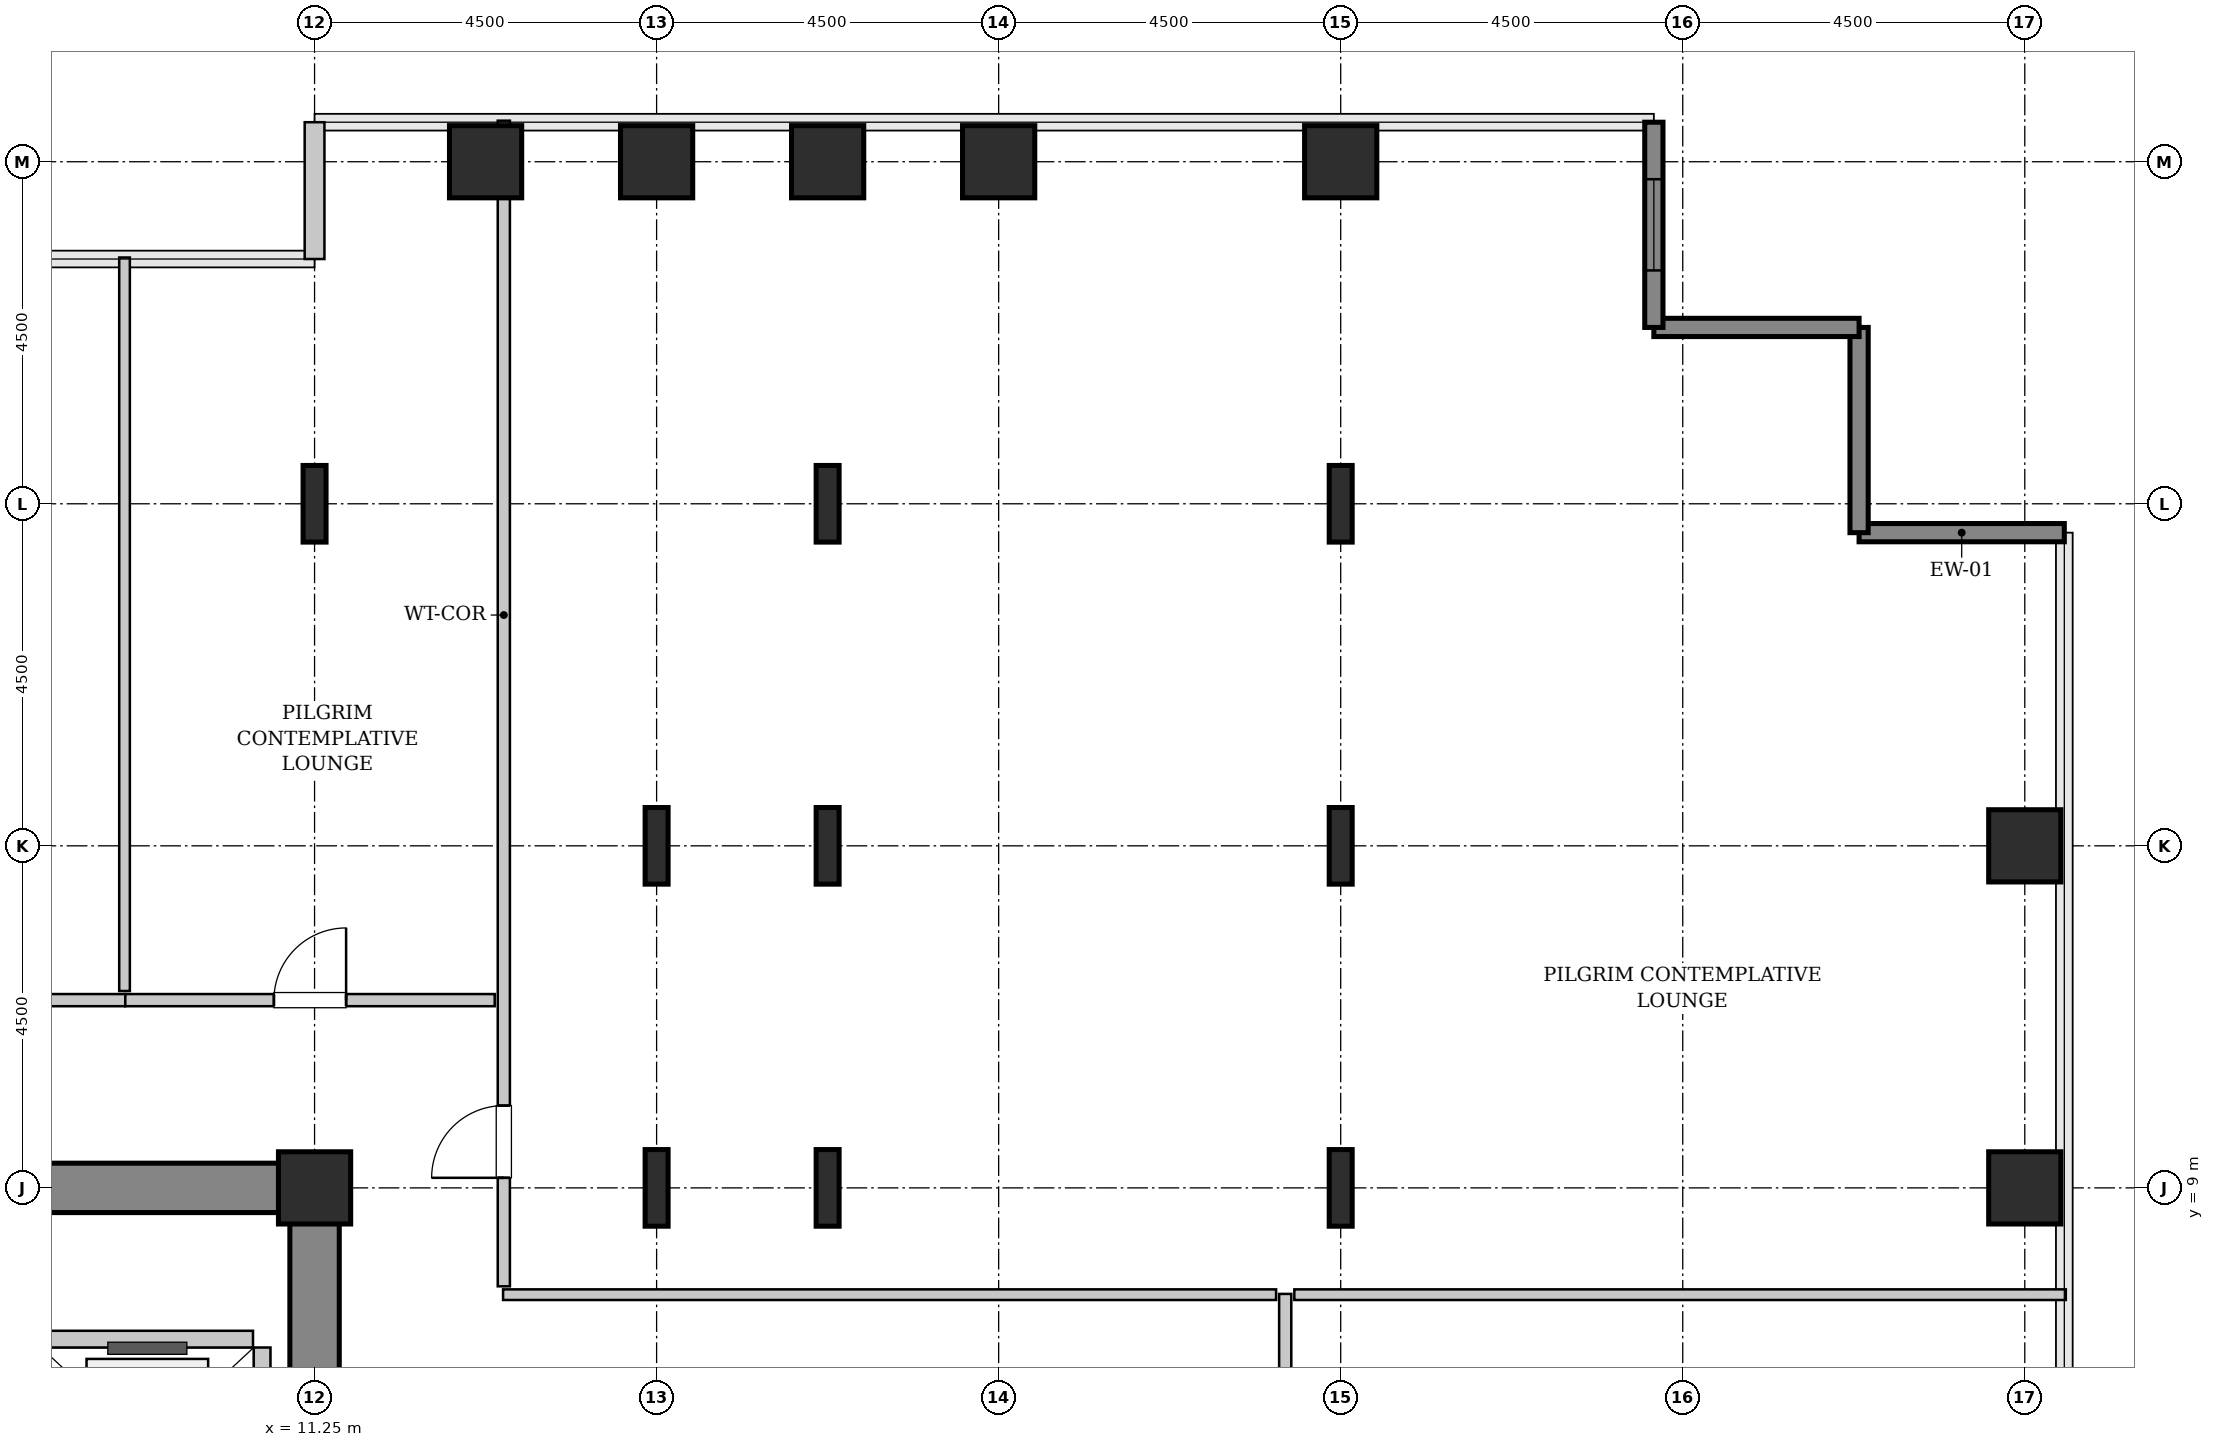
"""IFC4 building model, lengths in metres.
Left out: names, types, materials, properties, quantities, classifications, styles, units other than length and angle.
Written with IfcOpenShell. Run it as: python <this file> out.ifc"""

import sys

from ifc_helpers import new_model, si_unit, direction, frame, frame_2d, origin, origin_2d, place, context, subcontext, project, spatial, rectangle, hollow_rectangle, i_section, extrude, source, transform, mapped, element, fill, save


model = new_model("IFC4")
c1 = context("Model", 3, precision=1e-05, world=origin(), true_north=direction((0.0, 1.0)))
c2 = subcontext(c1, "Body", "Model", "MODEL_VIEW")
j1 = project(units=[si_unit("LENGTHUNIT", "METRE"), si_unit("PLANEANGLEUNIT", "RADIAN")], contexts=[c1])
p1 = place(None, origin())
s1 = spatial("IfcSite", under=j1, at=p1, CompositionType="ELEMENT")
p2 = place(p1, origin())
s2 = spatial("IfcBuilding", under=s1, at=p2, CompositionType="ELEMENT")
p3 = place(p2, frame((0.0, 0.0, 82.4)))
s3 = spatial("IfcBuildingStorey", under=s2, at=p3, CompositionType="ELEMENT", Elevation=82.4)
m1 = source(origin(), c2, "Body", "SweptSolid", [
    extrude(rectangle(XDim=10.025, YDim=0.65, at=frame_2d((5.012, 0.0))), origin(), (0.0, 0.0, 1.0), 3.8),
])
p4 = place(p3, frame((1.55, 9.0, 0.0), z_axis=(0.0, 0.0, 1.0), x_axis=(1.0, 0.0, 0.0)))
e1 = element("IfcWall", 1, at=p4, inside=s3, PredefinedType="SHEAR", context=c2, shape_type="MappedRepresentation", body=[
    mapped(m1, transform((0.0, 0.0, 0.0), x_axis=(1.0, 0.0, 0.0), y_axis=(0.0, 1.0, 0.0), z_axis=(0.0, 0.0, 1.0), scale=1.0)),
])
m2 = source(origin(), c2, "Body", "SweptSolid", [
    extrude(rectangle(XDim=7.325, YDim=0.65, at=frame_2d((3.663, 0.0))), origin(), (0.0, 0.0, 1.0), 3.8),
])
p5 = place(p3, frame((11.25, 1.35, 0.0), z_axis=(0.0, 0.0, 1.0), x_axis=(0.0, 1.0, 0.0)))
e2 = element("IfcWall", 2, at=p5, inside=s3, PredefinedType="SHEAR", context=c2, shape_type="MappedRepresentation", body=[
    mapped(m2, transform((0.0, 0.0, 0.0), x_axis=(1.0, 0.0, 0.0), y_axis=(0.0, 1.0, 0.0), z_axis=(0.0, 0.0, 1.0), scale=1.0)),
])
m3 = source(origin(), c2, "Body", "SweptSolid", [
    extrude(hollow_rectangle(XDim=0.95, YDim=0.95, WallThickness=0.045, InnerFilletRadius=0.045, OuterFilletRadius=0.09, at=origin_2d()), origin(), (0.0, 0.0, 1.0), 3.8),
])
p6 = place(p3, frame((11.25, 9.0, 0.0), z_axis=(0.0, 0.0, 1.0), x_axis=(1.0, 0.0, 0.0)))
e3 = element("IfcColumn", 3, at=p6, inside=s3, PredefinedType="COLUMN", context=c2, shape_type="MappedRepresentation", body=[
    mapped(m3, transform((0.0, 0.0, 0.0), x_axis=(1.0, 0.0, 0.0), y_axis=(0.0, 1.0, 0.0), z_axis=(0.0, 0.0, 1.0), scale=1.0)),
])
m4 = source(origin(), c2, "Body", "SweptSolid", [
    extrude(i_section(OverallWidth=0.302, OverallDepth=1.008, WebThickness=0.021, FlangeThickness=0.04, FilletRadius=0.03, at=origin_2d()), origin(), (0.0, 0.0, 1.0), 3.8),
])
p7 = place(p3, frame((11.25, 18.0, 0.0), z_axis=(0.0, 0.0, 1.0), x_axis=(1.0, 0.0, 0.0)))
e4 = element("IfcColumn", 4, at=p7, inside=s3, PredefinedType="COLUMN", context=c2, shape_type="MappedRepresentation", body=[
    mapped(m4, transform((0.0, 0.0, 0.0), x_axis=(1.0, 0.0, 0.0), y_axis=(0.0, 1.0, 0.0), z_axis=(0.0, 0.0, 1.0), scale=1.0)),
])
m5 = source(origin(), c2, "Body", "SweptSolid", [
    extrude(hollow_rectangle(XDim=0.95, YDim=0.95, WallThickness=0.045, InnerFilletRadius=0.045, OuterFilletRadius=0.09, at=origin_2d()), origin(), (0.0, 0.0, 1.0), 3.8),
])
p8 = place(p3, frame((13.5, 22.5, 0.0), z_axis=(0.0, 0.0, 1.0), x_axis=(1.0, 0.0, 0.0)))
e5 = element("IfcColumn", 5, at=p8, inside=s3, PredefinedType="COLUMN", context=c2, shape_type="MappedRepresentation", body=[
    mapped(m5, transform((0.0, 0.0, 0.0), x_axis=(1.0, 0.0, 0.0), y_axis=(0.0, 1.0, 0.0), z_axis=(0.0, 0.0, 1.0), scale=1.0)),
])
for number, where, z_axis, x_axis in (
    (6, (15.75, 9.0, 0.0), (0.0, 0.0, 1.0), (1.0, 0.0, 0.0)),
    (7, (15.75, 13.5, 0.0), (0.0, 0.0, 1.0), (1.0, 0.0, 0.0)),
):
    element("IfcColumn", number, at=place(p3, frame(where, z_axis=z_axis, x_axis=x_axis)), inside=s3, PredefinedType="COLUMN", context=c2, shape_type="MappedRepresentation", body=[
        mapped(m4, transform((0.0, 0.0, 0.0), x_axis=(1.0, 0.0, 0.0), y_axis=(0.0, 1.0, 0.0), z_axis=(0.0, 0.0, 1.0), scale=1.0)),
    ])
p9 = place(p3, frame((15.75, 22.5, 0.0), z_axis=(0.0, 0.0, 1.0), x_axis=(1.0, 0.0, 0.0)))
e8 = element("IfcColumn", 8, at=p9, inside=s3, PredefinedType="COLUMN", context=c2, shape_type="MappedRepresentation", body=[
    mapped(m5, transform((0.0, 0.0, 0.0), x_axis=(1.0, 0.0, 0.0), y_axis=(0.0, 1.0, 0.0), z_axis=(0.0, 0.0, 1.0), scale=1.0)),
])
for number, where, z_axis, x_axis in (
    (9, (18.0, 9.0, 0.0), (0.0, 0.0, 1.0), (1.0, 0.0, 0.0)),
    (10, (18.0, 13.5, 0.0), (0.0, 0.0, 1.0), (1.0, 0.0, 0.0)),
    (11, (18.0, 18.0, 0.0), (0.0, 0.0, 1.0), (1.0, 0.0, 0.0)),
):
    element("IfcColumn", number, at=place(p3, frame(where, z_axis=z_axis, x_axis=x_axis)), inside=s3, PredefinedType="COLUMN", context=c2, shape_type="MappedRepresentation", body=[
        mapped(m4, transform((0.0, 0.0, 0.0), x_axis=(1.0, 0.0, 0.0), y_axis=(0.0, 1.0, 0.0), z_axis=(0.0, 0.0, 1.0), scale=1.0)),
    ])
for number, where, z_axis, x_axis in (
    (12, (18.0, 22.5, 0.0), (0.0, 0.0, 1.0), (1.0, 0.0, 0.0)),
    (13, (20.25, 22.5, 0.0), (0.0, 0.0, 1.0), (1.0, 0.0, 0.0)),
):
    element("IfcColumn", number, at=place(p3, frame(where, z_axis=z_axis, x_axis=x_axis)), inside=s3, PredefinedType="COLUMN", context=c2, shape_type="MappedRepresentation", body=[
        mapped(m5, transform((0.0, 0.0, 0.0), x_axis=(1.0, 0.0, 0.0), y_axis=(0.0, 1.0, 0.0), z_axis=(0.0, 0.0, 1.0), scale=1.0)),
    ])
for number, where, z_axis, x_axis in (
    (14, (24.75, 9.0, 0.0), (0.0, 0.0, 1.0), (1.0, 0.0, 0.0)),
    (15, (24.75, 13.5, 0.0), (0.0, 0.0, 1.0), (1.0, 0.0, 0.0)),
    (16, (24.75, 18.0, 0.0), (0.0, 0.0, 1.0), (1.0, 0.0, 0.0)),
):
    element("IfcColumn", number, at=place(p3, frame(where, z_axis=z_axis, x_axis=x_axis)), inside=s3, PredefinedType="COLUMN", context=c2, shape_type="MappedRepresentation", body=[
        mapped(m4, transform((0.0, 0.0, 0.0), x_axis=(1.0, 0.0, 0.0), y_axis=(0.0, 1.0, 0.0), z_axis=(0.0, 0.0, 1.0), scale=1.0)),
    ])
for number, where, z_axis, x_axis in (
    (17, (24.75, 22.5, 0.0), (0.0, 0.0, 1.0), (1.0, 0.0, 0.0)),
    (18, (33.75, 9.0, 0.0), (0.0, 0.0, 1.0), (1.0, 0.0, 0.0)),
    (19, (33.75, 13.5, 0.0), (0.0, 0.0, 1.0), (1.0, 0.0, 0.0)),
):
    element("IfcColumn", number, at=place(p3, frame(where, z_axis=z_axis, x_axis=x_axis)), inside=s3, PredefinedType="COLUMN", context=c2, shape_type="MappedRepresentation", body=[
        mapped(m5, transform((0.0, 0.0, 0.0), x_axis=(1.0, 0.0, 0.0), y_axis=(0.0, 1.0, 0.0), z_axis=(0.0, 0.0, 1.0), scale=1.0)),
    ])
m6 = source(origin(), c2, "Body", "SweptSolid", [
    extrude(rectangle(XDim=2.7, YDim=0.24, at=frame_2d((1.35, 0.0))), origin(), (0.0, 0.0, 1.0), 3.5),
])
for number, where, z_axis, x_axis in (
    (20, (34.27, 17.62, 0.0), (0.0, 0.0, 1.0), (-1.0, 0.0, 0.0)),
    (21, (31.57, 17.62, 0.0), (0.0, 0.0, 1.0), (0.0, 1.0, 0.0)),
    (22, (31.57, 20.32, 0.0), (0.0, 0.0, 1.0), (-1.0, 0.0, 0.0)),
):
    element("IfcWall", number, at=place(p3, frame(where, z_axis=z_axis, x_axis=x_axis)), inside=s3, PredefinedType="SHEAR", context=c2, shape_type="MappedRepresentation", body=[
        mapped(m6, transform((0.0, 0.0, 0.0), x_axis=(1.0, 0.0, 0.0), y_axis=(0.0, 1.0, 0.0), z_axis=(0.0, 0.0, 1.0), scale=1.0)),
    ])
p10 = place(p3, frame((28.87, 20.32, 0.0), z_axis=(0.0, 0.0, 1.0), x_axis=(0.0, 1.0, 0.0)))
e23 = element("IfcWall", 23, at=p10, inside=s3, PredefinedType="SHEAR", context=c2, shape_type="MappedRepresentation", body=[
    mapped(m6, transform((0.0, 0.0, 0.0), x_axis=(1.0, 0.0, 0.0), y_axis=(0.0, 1.0, 0.0), z_axis=(0.0, 0.0, 1.0), scale=1.0)),
])
p11 = place(p10, frame((0.75, 0.0, 0.85)))
e24 = element("IfcOpeningElement", 24, at=p11, cuts=e23, PredefinedType="OPENING", context=c2, shape_type="SweptSolid", body=[
    extrude(rectangle(XDim=1.2, YDim=1.8, at=frame_2d((0.6, 0.9))), frame((0.0, 0.13, 0.0), z_axis=(0.0, -1.0, 0.0), x_axis=(1.0, 0.0, 0.0)), (0.0, 0.0, 1.0), 0.26),
])
m7 = source(origin(), c2, "Body", "SweptSolid", [
    extrude(rectangle(XDim=1.8, YDim=0.26, at=frame_2d((0.9, 0.0))), origin(), (0.0, 0.0, 1.0), 3.5),
])
p12 = place(p3, frame((11.25, 23.02, 0.0), z_axis=(0.0, 0.0, 1.0), x_axis=(0.0, -1.0, 0.0)))
e25 = element("IfcWall", 25, at=p12, inside=s3, PredefinedType="SOLIDWALL", context=c2, shape_type="MappedRepresentation", body=[
    mapped(m7, transform((0.0, 0.0, 0.0), x_axis=(1.0, 0.0, 0.0), y_axis=(0.0, 1.0, 0.0), z_axis=(0.0, 0.0, 1.0), scale=1.0)),
])
m8 = source(origin(), c2, "Body", "SweptSolid", [
    extrude(rectangle(XDim=5.45, YDim=0.22, at=frame_2d((2.725, 0.0))), origin(), (0.0, 0.0, 1.0), 3.485),
])
p13 = place(p3, frame((10.56, 1.45, 0.0), z_axis=(0.0, 0.0, 1.0), x_axis=(0.0, 1.0, 0.0)))
e26 = element("IfcWall", 26, at=p13, inside=s3, PredefinedType="SOLIDWALL", context=c2, shape_type="MappedRepresentation", body=[
    mapped(m8, transform((0.0, 0.0, 0.0), x_axis=(1.0, 0.0, 0.0), y_axis=(0.0, 1.0, 0.0), z_axis=(0.0, 0.0, 1.0), scale=1.0)),
])
m9 = source(origin(), c2, "Body", "SweptSolid", [
    extrude(rectangle(XDim=2.78, YDim=0.22, at=frame_2d((1.39, 0.0))), origin(), (0.0, 0.0, 1.0), 3.485),
])
p14 = place(p3, frame((10.44, 7.01, 0.0), z_axis=(0.0, 0.0, 1.0), x_axis=(-1.0, 0.0, 0.0)))
e27 = element("IfcWall", 27, at=p14, inside=s3, PredefinedType="SOLIDWALL", context=c2, shape_type="MappedRepresentation", body=[
    mapped(m9, transform((0.0, 0.0, 0.0), x_axis=(1.0, 0.0, 0.0), y_axis=(0.0, 1.0, 0.0), z_axis=(0.0, 0.0, 1.0), scale=1.0)),
])
m10 = source(origin(), c2, "Body", "SweptSolid", [
    extrude(rectangle(XDim=15.7, YDim=0.16, at=frame_2d((7.85, 0.0))), origin(), (0.0, 0.0, 1.0), 3.485),
])
p15 = place(p3, frame((24.02, -8.095, 0.0), z_axis=(0.0, 0.0, 1.0), x_axis=(0.0, 1.0, 0.0)))
e28 = element("IfcWall", 28, at=p15, inside=s3, PredefinedType="PARTITIONING", context=c2, shape_type="MappedRepresentation", body=[
    mapped(m10, transform((0.0, 0.0, 0.0), x_axis=(1.0, 0.0, 0.0), y_axis=(0.0, 1.0, 0.0), z_axis=(0.0, 0.0, 1.0), scale=1.0)),
])
p16 = place(p15, frame((9.87, 0.0, 0.0)))
e29 = element("IfcOpeningElement", 29, at=p16, cuts=e28, PredefinedType="OPENING", context=c2, shape_type="SweptSolid", body=[
    extrude(rectangle(XDim=0.95, YDim=2.1, at=frame_2d((0.475, 1.05))), frame((0.0, 0.09, 0.0), z_axis=(0.0, -1.0, 0.0), x_axis=(1.0, 0.0, 0.0)), (0.0, 0.0, 1.0), 0.18),
])
m11 = source(origin(), c2, "Body", "SweptSolid", [
    extrude(rectangle(XDim=10.17, YDim=0.14, at=frame_2d((5.085, 0.0))), origin(), (0.0, 0.0, 1.0), 3.485),
])
p17 = place(p3, frame((13.73, 7.595, 0.0), z_axis=(0.0, 0.0, 1.0), x_axis=(1.0, 0.0, 0.0)))
e30 = element("IfcWall", 30, at=p17, inside=s3, PredefinedType="PARTITIONING", context=c2, shape_type="MappedRepresentation", body=[
    mapped(m11, transform((0.0, 0.0, 0.0), x_axis=(1.0, 0.0, 0.0), y_axis=(0.0, 1.0, 0.0), z_axis=(0.0, 0.0, 1.0), scale=1.0)),
])
m12 = source(origin(), c2, "Body", "SweptSolid", [
    extrude(rectangle(XDim=10.15, YDim=0.14, at=frame_2d((5.075, 0.0))), origin(), (0.0, 0.0, 1.0), 3.485),
])
p18 = place(p3, frame((24.14, 7.595, 0.0), z_axis=(0.0, 0.0, 1.0), x_axis=(1.0, 0.0, 0.0)))
e31 = element("IfcWall", 31, at=p18, inside=s3, PredefinedType="PARTITIONING", context=c2, shape_type="MappedRepresentation", body=[
    mapped(m12, transform((0.0, 0.0, 0.0), x_axis=(1.0, 0.0, 0.0), y_axis=(0.0, 1.0, 0.0), z_axis=(0.0, 0.0, 1.0), scale=1.0)),
])
m13 = source(origin(), c2, "Body", "SweptSolid", [
    extrude(rectangle(XDim=15.335, YDim=0.16, at=frame_2d((7.667, 0.0))), origin(), (0.0, 0.0, 1.0), 3.485),
])
p19 = place(p3, frame((13.74, 7.705, 0.0), z_axis=(0.0, 0.0, 1.0), x_axis=(0.0, 1.0, 0.0)))
e32 = element("IfcWall", 32, at=p19, inside=s3, PredefinedType="PARTITIONING", context=c2, shape_type="MappedRepresentation", body=[
    mapped(m13, transform((0.0, 0.0, 0.0), x_axis=(1.0, 0.0, 0.0), y_axis=(0.0, 1.0, 0.0), z_axis=(0.0, 0.0, 1.0), scale=1.0)),
])
p20 = place(p19, frame((1.427, 0.0, 0.0)))
e33 = element("IfcOpeningElement", 33, at=p20, cuts=e32, PredefinedType="OPENING", context=c2, shape_type="SweptSolid", body=[
    extrude(rectangle(XDim=0.95, YDim=2.1, at=frame_2d((0.475, 1.05))), frame((0.0, 0.09, 0.0), z_axis=(0.0, -1.0, 0.0), x_axis=(1.0, 0.0, 0.0)), (0.0, 0.0, 1.0), 0.18),
])
m14 = source(origin(), c2, "Body", "SweptSolid", [
    extrude(rectangle(XDim=4.965, YDim=0.16, at=frame_2d((2.482, 0.0))), origin(), (0.0, 0.0, 1.0), 3.485),
])
p21 = place(p3, frame((3.795, 11.47, 0.0), z_axis=(0.0, 0.0, 1.0), x_axis=(1.0, 0.0, 0.0)))
e34 = element("IfcWall", 34, at=p21, inside=s3, PredefinedType="PARTITIONING", context=c2, shape_type="MappedRepresentation", body=[
    mapped(m14, transform((0.0, 0.0, 0.0), x_axis=(1.0, 0.0, 0.0), y_axis=(0.0, 1.0, 0.0), z_axis=(0.0, 0.0, 1.0), scale=1.0)),
])
p22 = place(p21, frame((2.008, 0.0, 0.0)))
e35 = element("IfcOpeningElement", 35, at=p22, cuts=e34, PredefinedType="OPENING", context=c2, shape_type="SweptSolid", body=[
    extrude(rectangle(XDim=0.95, YDim=2.1, at=frame_2d((0.475, 1.05))), frame((0.0, 0.09, 0.0), z_axis=(0.0, -1.0, 0.0), x_axis=(1.0, 0.0, 0.0)), (0.0, 0.0, 1.0), 0.18),
])
m15 = source(origin(), c2, "Body", "SweptSolid", [
    extrude(rectangle(XDim=9.65, YDim=0.14, at=frame_2d((4.825, 0.0))), origin(), (0.0, 0.0, 1.0), 3.485),
])
p23 = place(p3, frame((8.75, 11.59, 0.0), z_axis=(0.0, 0.0, 1.0), x_axis=(0.0, 1.0, 0.0)))
e36 = element("IfcWall", 36, at=p23, inside=s3, PredefinedType="PARTITIONING", context=c2, shape_type="MappedRepresentation", body=[
    mapped(m15, transform((0.0, 0.0, 0.0), x_axis=(1.0, 0.0, 0.0), y_axis=(0.0, 1.0, 0.0), z_axis=(0.0, 0.0, 1.0), scale=1.0)),
])
m16 = source(origin(), c2, "Body", "SweptSolid", [
    extrude(rectangle(XDim=4.86, YDim=0.16, at=frame_2d((2.43, 0.0))), origin(), (0.0, 0.0, 1.0), 3.485),
])
p24 = place(p3, frame((8.76, 11.47, 0.0), z_axis=(0.0, 0.0, 1.0), x_axis=(1.0, 0.0, 0.0)))
e37 = element("IfcWall", 37, at=p24, inside=s3, PredefinedType="PARTITIONING", context=c2, shape_type="MappedRepresentation", body=[
    mapped(m16, transform((0.0, 0.0, 0.0), x_axis=(1.0, 0.0, 0.0), y_axis=(0.0, 1.0, 0.0), z_axis=(0.0, 0.0, 1.0), scale=1.0)),
])
p25 = place(p24, frame((1.955, 0.0, 0.0)))
e38 = element("IfcOpeningElement", 38, at=p25, cuts=e37, PredefinedType="OPENING", context=c2, shape_type="SweptSolid", body=[
    extrude(rectangle(XDim=0.95, YDim=2.1, at=frame_2d((0.475, 1.05))), frame((0.0, 0.09, 0.0), z_axis=(0.0, -1.0, 0.0), x_axis=(1.0, 0.0, 0.0)), (0.0, 0.0, 1.0), 0.18),
])
m17 = source(origin(), c2, "Body", "SweptSolid", [
    extrude(rectangle(XDim=1.2, YDim=1.8, at=frame_2d((0.6, 0.9))), frame((0.0, 0.03, 0.0), z_axis=(0.0, -1.0, 0.0), x_axis=(1.0, 0.0, 0.0)), (0.0, 0.0, 1.0), 0.06),
])
p26 = place(p11, origin())
e39 = element("IfcWindow", 39, at=p26, inside=s3, PartitioningType="SINGLE_PANEL", PredefinedType="WINDOW", context=c2, shape_type="MappedRepresentation", body=[
    mapped(m17, transform((0.0, 0.0, 0.0), x_axis=(1.0, 0.0, 0.0), y_axis=(0.0, 1.0, 0.0), z_axis=(0.0, 0.0, 1.0), scale=1.0)),
])
fill(e24, e39)
m18 = source(origin(), c2, "Body", "SweptSolid", [
    extrude(rectangle(XDim=0.95, YDim=2.1, at=frame_2d((0.475, 1.05))), frame((0.0, 0.025, 0.0), z_axis=(0.0, -1.0, 0.0), x_axis=(1.0, 0.0, 0.0)), (0.0, 0.0, 1.0), 0.05),
])
p27 = place(p20, origin())
e40 = element("IfcDoor", 40, at=p27, inside=s3, OperationType="SINGLE_SWING_LEFT", PredefinedType="DOOR", context=c2, shape_type="MappedRepresentation", body=[
    mapped(m18, transform((0.0, 0.0, 0.0), x_axis=(1.0, 0.0, 0.0), y_axis=(0.0, 1.0, 0.0), z_axis=(0.0, 0.0, 1.0), scale=1.0)),
])
fill(e33, e40)
p28 = place(p25, origin())
e41 = element("IfcDoor", 41, at=p28, inside=s3, OperationType="SINGLE_SWING_RIGHT", PredefinedType="DOOR", context=c2, shape_type="MappedRepresentation", body=[
    mapped(m18, transform((0.0, 0.0, 0.0), x_axis=(1.0, 0.0, 0.0), y_axis=(0.0, 1.0, 0.0), z_axis=(0.0, 0.0, 1.0), scale=1.0)),
])
fill(e38, e41)
save(model, sys.argv[1])
